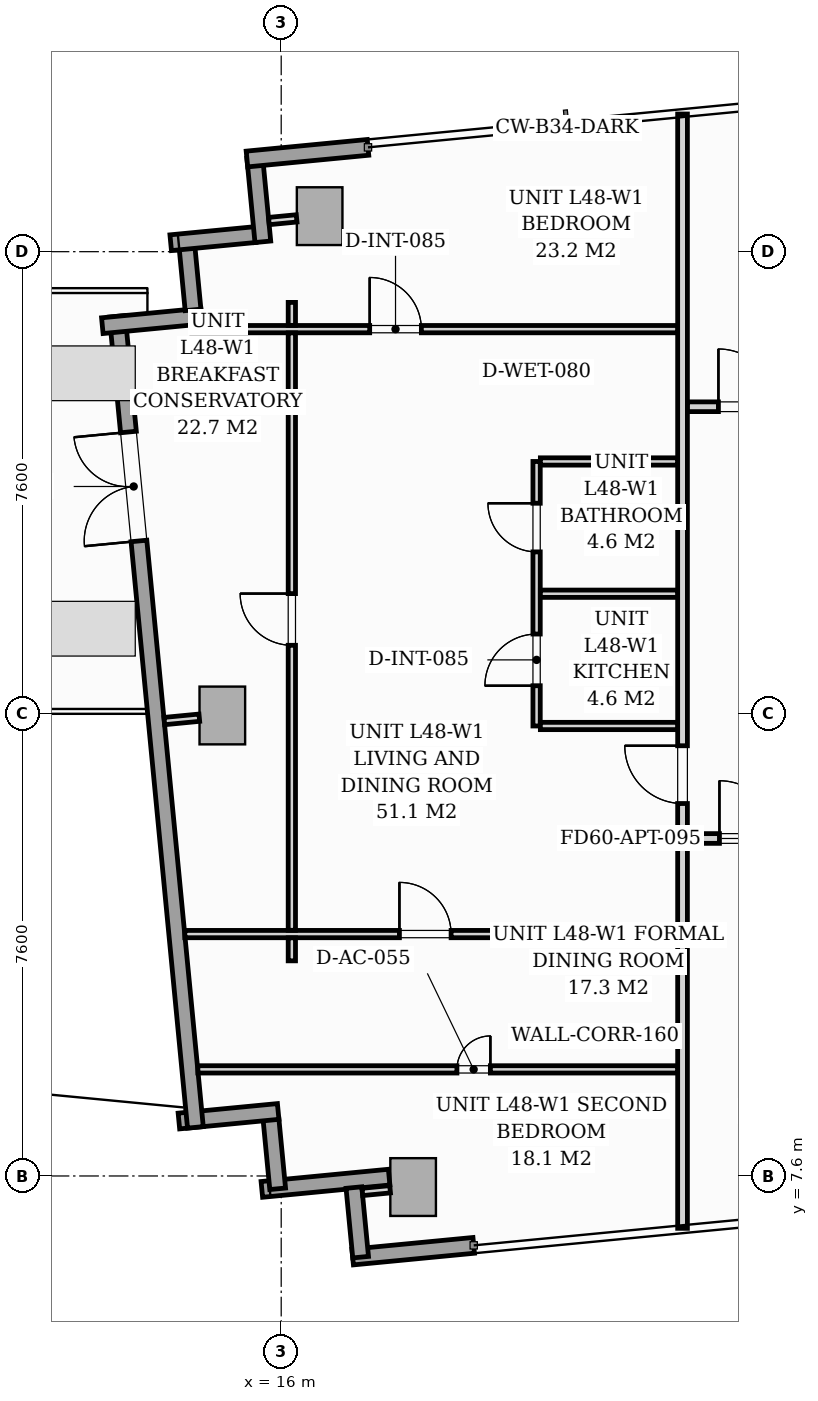
"""IFC4 building model, lengths in metres.
Left out: names, types, materials, properties, quantities, classifications, styles, units other than length and angle.
Written with IfcOpenShell. Run it as: python <this file> out.ifc"""

import sys

from ifc_helpers import new_model, si_unit, direction, frame, frame_2d, origin, origin_2d, place, context, subcontext, project, spatial, rectangle, extrude, source, transform, mapped, element, fill, save


model = new_model("IFC4")
c1 = context("Model", 3, precision=1e-05, world=origin(), true_north=direction((0.0, 1.0)))
c2 = subcontext(c1, "Body", "Model", "MODEL_VIEW")
j1 = project(units=[si_unit("LENGTHUNIT", "METRE"), si_unit("PLANEANGLEUNIT", "RADIAN")], contexts=[c1])
p1 = place(None, origin())
s1 = spatial("IfcSite", under=j1, at=p1, CompositionType="ELEMENT")
p2 = place(p1, origin())
s2 = spatial("IfcBuilding", under=s1, at=p2, CompositionType="ELEMENT")
p3 = place(p2, frame((0.0, 0.0, 167.8)))
s3 = spatial("IfcBuildingStorey", under=s2, at=p3, CompositionType="ELEMENT", Elevation=167.8)
m1 = source(origin(), c2, "Body", "SweptSolid", [
    extrude(rectangle(XDim=0.75, YDim=0.95, at=origin_2d()), origin(), (0.0, 0.0, 1.0), 5.194),
])
for number, where, z_axis, x_axis in (
    (1, (18.169, 7.418, 0.004), (0.0, 0.0, 1.0), (0.995, 0.096, 0.0)),
    (2, (16.632, 23.384, 0.004), (0.0, 0.0, 1.0), (0.995, 0.096, 0.0)),
    (3, (15.032, 15.173, 0.004), (0.0, 0.0, 1.0), (0.995, 0.096, 0.0)),
):
    element("IfcColumn", number, at=place(p3, frame(where, z_axis=z_axis, x_axis=x_axis)), inside=s3, PredefinedType="COLUMN", context=c2, shape_type="MappedRepresentation", body=[
        mapped(m1, transform((0.0, 0.0, 0.0), scale=1.0)),
    ])
p4 = place(p3, frame((17.775, 7.581, 0.0), z_axis=(0.0, 0.0, 1.0), x_axis=(-0.995392638166, -0.095882719431, 0.0)))
e4 = element("IfcWall", 4, at=p4, inside=s3, PredefinedType="STANDARD", context=c2, shape_type="SweptSolid", body=[
    extrude(rectangle(XDim=2.103, YDim=0.26, at=frame_2d((1.052, 0.0))), origin(), (0.0, 0.0, 1.0), 4.94),
])
p5 = place(p3, frame((15.942, 7.389, 0.0), z_axis=(0.0, 0.0, 1.0), x_axis=(-0.09576095695, 0.995404359607, 0.0)))
e5 = element("IfcWall", 5, at=p5, inside=s3, PredefinedType="STANDARD", context=c2, shape_type="SweptSolid", body=[
    extrude(rectangle(XDim=1.15, YDim=0.26, at=frame_2d((0.575, 0.0))), origin(), (0.0, 0.0, 1.0), 4.94),
])
p6 = place(p3, frame((15.95, 8.661, 0.0), z_axis=(0.0, 0.0, 1.0), x_axis=(-0.995394563142, -0.095862733462, 0.0)))
e6 = element("IfcWall", 6, at=p6, inside=s3, PredefinedType="STANDARD", context=c2, shape_type="SweptSolid", body=[
    extrude(rectangle(XDim=1.64, YDim=0.26, at=frame_2d((0.82, 0.0))), origin(), (0.0, 0.0, 1.0), 4.94),
])
p7 = place(p3, frame((14.589, 8.399, 0.0), z_axis=(0.0, 0.0, 1.0), x_axis=(-0.095853703289, 0.995395432763, 0.0)))
e7 = element("IfcWall", 7, at=p7, inside=s3, PredefinedType="STANDARD", context=c2, shape_type="SweptSolid", body=[
    extrude(rectangle(XDim=13.4, YDim=0.26, at=frame_2d((6.7, 0.0))), origin(), (0.0, 0.0, 1.0), 4.94),
])
p8 = place(p7, frame((9.688, 0.0, 0.0)))
e8 = element("IfcOpeningElement", 8, at=p8, cuts=e7, PredefinedType="OPENING", context=c2, shape_type="SweptSolid", body=[
    extrude(rectangle(XDim=1.8, YDim=2.1, at=frame_2d((0.9, 1.05))), frame((0.0, 0.14, 0.0), z_axis=(0.0, -1.0, 0.0), x_axis=(1.0, 0.0, 0.0)), (0.0, 0.0, 1.0), 0.28),
])
p9 = place(p3, frame((13.058, 21.583, 0.0), z_axis=(0.0, 0.0, 1.0), x_axis=(0.995394563142, 0.095862733462, 0.0)))
e9 = element("IfcWall", 9, at=p9, inside=s3, PredefinedType="STANDARD", context=c2, shape_type="SweptSolid", body=[
    extrude(rectangle(XDim=1.64, YDim=0.26, at=frame_2d((0.82, 0.0))), origin(), (0.0, 0.0, 1.0), 4.94),
])
p10 = place(p3, frame((14.55, 21.843, 0.0), z_axis=(0.0, 0.0, 1.0), x_axis=(-0.09576095695, 0.995404359607, 0.0)))
e10 = element("IfcWall", 10, at=p10, inside=s3, PredefinedType="STANDARD", context=c2, shape_type="SweptSolid", body=[
    extrude(rectangle(XDim=1.15, YDim=0.26, at=frame_2d((0.575, 0.0))), origin(), (0.0, 0.0, 1.0), 4.94),
])
p11 = place(p3, frame((14.183, 22.947, 0.0), z_axis=(0.0, 0.0, 1.0), x_axis=(0.99540614245, 0.095742423056, 0.0)))
e11 = element("IfcWall", 11, at=p11, inside=s3, PredefinedType="STANDARD", context=c2, shape_type="SweptSolid", body=[
    extrude(rectangle(XDim=1.395, YDim=0.26, at=frame_2d((0.697, 0.0))), origin(), (0.0, 0.0, 1.0), 4.94),
])
p12 = place(p3, frame((15.698, 22.963, 0.0), z_axis=(0.0, 0.0, 1.0), x_axis=(-0.09589913835, 0.995391056452, 0.0)))
e12 = element("IfcWall", 12, at=p12, inside=s3, PredefinedType="STANDARD", context=c2, shape_type="SweptSolid", body=[
    extrude(rectangle(XDim=1.395, YDim=0.26, at=frame_2d((0.698, 0.0))), origin(), (0.0, 0.0, 1.0), 4.94),
])
p13 = place(p3, frame((15.437, 24.324, 0.0), z_axis=(0.0, 0.0, 1.0), x_axis=(0.995398960025, 0.095817067274, 0.0)))
e13 = element("IfcWall", 13, at=p13, inside=s3, PredefinedType="STANDARD", context=c2, shape_type="SweptSolid", body=[
    extrude(rectangle(XDim=2.0, YDim=0.26, at=frame_2d((1.0, 0.0))), origin(), (0.0, 0.0, 1.0), 4.94),
])
p14 = place(p3, frame((19.166, 6.459, 0.0), z_axis=(0.0, 0.0, 1.0), x_axis=(-0.995397839199, -0.095828710298, 0.0)))
e14 = element("IfcWall", 14, at=p14, inside=s3, PredefinedType="STANDARD", context=c2, shape_type="SweptSolid", body=[
    extrude(rectangle(XDim=2.0, YDim=0.26, at=frame_2d((1.0, 0.0))), origin(), (0.0, 0.0, 1.0), 4.94),
])
p15 = place(p3, frame((17.306, 6.265, 0.0), z_axis=(0.0, 0.0, 1.0), x_axis=(-0.095971333708, 0.995384098279, 0.0)))
e15 = element("IfcWall", 15, at=p15, inside=s3, PredefinedType="STANDARD", context=c2, shape_type="SweptSolid", body=[
    extrude(rectangle(XDim=1.15, YDim=0.26, at=frame_2d((0.575, 0.0))), origin(), (0.0, 0.0, 1.0), 4.94),
])
p16 = place(p3, frame((22.6, 13.15, 0.0), z_axis=(0.0, 0.0, 1.0), x_axis=(1.0, 0.0, 0.0)))
e16 = element("IfcWall", 16, at=p16, inside=s3, PredefinedType="PARTITIONING", context=c2, shape_type="SweptSolid", body=[
    extrude(rectangle(XDim=23.28, YDim=0.16, at=frame_2d((11.64, 0.0))), origin(), (0.0, 0.0, 1.0), 4.94),
])
p17 = place(p16, frame((0.607, 0.0, 0.0)))
e17 = element("IfcOpeningElement", 17, at=p17, cuts=e16, PredefinedType="OPENING", context=c2, shape_type="SweptSolid", body=[
    extrude(rectangle(XDim=0.95, YDim=2.06, at=frame_2d((0.475, 1.03))), frame((0.0, 0.09, 0.0), z_axis=(0.0, -1.0, 0.0), x_axis=(1.0, 0.0, 0.0)), (0.0, 0.0, 1.0), 0.18),
])
p18 = place(p16, frame((11.717, 0.0, 0.0)))
e18 = element("IfcOpeningElement", 18, at=p18, cuts=e16, PredefinedType="OPENING", context=c2, shape_type="SweptSolid", body=[
    extrude(rectangle(XDim=0.95, YDim=2.06, at=frame_2d((0.475, 1.03))), frame((0.0, 0.09, 0.0), z_axis=(0.0, -1.0, 0.0), x_axis=(1.0, 0.0, 0.0)), (0.0, 0.0, 1.0), 0.18),
])
p19 = place(p3, frame((22.6, 6.74, 0.0), z_axis=(0.0, 0.0, 1.0), x_axis=(0.0, 1.0, 0.0)))
e19 = element("IfcWall", 19, at=p19, inside=s3, PredefinedType="PARTITIONING", context=c2, shape_type="SweptSolid", body=[
    extrude(rectangle(XDim=6.329, YDim=0.16, at=frame_2d((3.164, 0.0))), origin(), (0.0, 0.0, 1.0), 4.94),
])
p20 = place(p3, frame((22.6, 13.232, 0.0), z_axis=(0.0, 0.0, 1.0), x_axis=(0.0, 1.0, 0.0)))
e20 = element("IfcWall", 20, at=p20, inside=s3, PredefinedType="PARTITIONING", context=c2, shape_type="SweptSolid", body=[
    extrude(rectangle(XDim=11.832, YDim=0.16, at=frame_2d((5.916, 0.0))), origin(), (0.0, 0.0, 1.0), 4.94),
])
p21 = place(p20, frame((0.493, 0.0, 0.0)))
e21 = element("IfcOpeningElement", 21, at=p21, cuts=e20, PredefinedType="OPENING", context=c2, shape_type="SweptSolid", body=[
    extrude(rectangle(XDim=0.95, YDim=2.06, at=frame_2d((0.475, 1.03))), frame((0.0, 0.09, 0.0), z_axis=(0.0, -1.0, 0.0), x_axis=(1.0, 0.0, 0.0)), (0.0, 0.0, 1.0), 0.18),
])
p22 = place(p3, frame((20.2, 15.0, 0.0), z_axis=(0.0, 0.0, 1.0), x_axis=(0.0, 1.0, 0.0)))
e22 = element("IfcWall", 22, at=p22, inside=s3, PredefinedType="PARTITIONING", context=c2, shape_type="SweptSolid", body=[
    extrude(rectangle(XDim=4.35, YDim=0.12, at=frame_2d((2.175, 0.0))), origin(), (0.0, 0.0, 1.0), 4.94),
])
p23 = place(p22, frame((0.662, 0.0, 0.0)))
e23 = element("IfcOpeningElement", 23, at=p23, cuts=e22, PredefinedType="OPENING", context=c2, shape_type="SweptSolid", body=[
    extrude(rectangle(XDim=0.85, YDim=2.05, at=frame_2d((0.425, 1.025))), frame((0.0, 0.07, 0.0), z_axis=(0.0, -1.0, 0.0), x_axis=(1.0, 0.0, 0.0)), (0.0, 0.0, 1.0), 0.14),
])
p24 = place(p22, frame((2.863, 0.0, 0.0)))
e24 = element("IfcOpeningElement", 24, at=p24, cuts=e22, PredefinedType="OPENING", context=c2, shape_type="SweptSolid", body=[
    extrude(rectangle(XDim=0.8, YDim=2.02, at=frame_2d((0.4, 1.01))), frame((0.0, 0.07, 0.0), z_axis=(0.0, -1.0, 0.0), x_axis=(1.0, 0.0, 0.0)), (0.0, 0.0, 1.0), 0.14),
])
for number, where, z_axis, x_axis in (
    (25, (20.262, 17.175, 0.0), (0.0, 0.0, 1.0), (1.0, 0.0, 0.0)),
    (26, (20.262, 15.0, 0.0), (0.0, 0.0, 1.0), (1.0, 0.0, 0.0)),
    (27, (20.262, 19.35, 0.0), (0.0, 0.0, 1.0), (1.0, 0.0, 0.0)),
):
    element("IfcWall", number, at=place(p3, frame(where, z_axis=z_axis, x_axis=x_axis)), inside=s3, PredefinedType="PARTITIONING", context=c2, shape_type="SweptSolid", body=[
        extrude(rectangle(XDim=2.256, YDim=0.12, at=frame_2d((1.128, 0.0))), origin(), (0.0, 0.0, 1.0), 4.94),
    ])
p25 = place(p3, frame((14.53, 21.526, 0.0), z_axis=(0.0, 0.0, 1.0), x_axis=(1.0, 0.0, 0.0)))
e28 = element("IfcWall", 28, at=p25, inside=s3, PredefinedType="PARTITIONING", context=c2, shape_type="SweptSolid", body=[
    extrude(rectangle(XDim=7.988, YDim=0.12, at=frame_2d((3.994, 0.0))), origin(), (0.0, 0.0, 1.0), 4.94),
])
p26 = place(p25, frame((2.925, 0.0, 0.0)))
e29 = element("IfcOpeningElement", 29, at=p26, cuts=e28, PredefinedType="OPENING", context=c2, shape_type="SweptSolid", body=[
    extrude(rectangle(XDim=0.85, YDim=2.05, at=frame_2d((0.425, 1.025))), frame((0.0, 0.07, 0.0), z_axis=(0.0, -1.0, 0.0), x_axis=(1.0, 0.0, 0.0)), (0.0, 0.0, 1.0), 0.14),
])
p27 = place(p3, frame((14.63, 9.353, 0.0), z_axis=(0.0, 0.0, 1.0), x_axis=(1.0, 0.0, 0.0)))
e30 = element("IfcWall", 30, at=p27, inside=s3, PredefinedType="PARTITIONING", context=c2, shape_type="SweptSolid", body=[
    extrude(rectangle(XDim=7.888, YDim=0.12, at=frame_2d((3.944, 0.0))), origin(), (0.0, 0.0, 1.0), 4.94),
])
p28 = place(p27, frame((4.26, 0.0, 0.0)))
e31 = element("IfcOpeningElement", 31, at=p28, cuts=e30, PredefinedType="OPENING", context=c2, shape_type="SweptSolid", body=[
    extrude(rectangle(XDim=0.55, YDim=2.0, at=frame_2d((0.275, 1.0))), frame((0.0, 0.07, 0.0), z_axis=(0.0, -1.0, 0.0), x_axis=(1.0, 0.0, 0.0)), (0.0, 0.0, 1.0), 0.14),
])
p29 = place(p3, frame((14.416, 11.578, 0.0), z_axis=(0.0, 0.0, 1.0), x_axis=(1.0, 0.0, 0.0)))
e32 = element("IfcWall", 32, at=p29, inside=s3, PredefinedType="PARTITIONING", context=c2, shape_type="SweptSolid", body=[
    extrude(rectangle(XDim=8.103, YDim=0.12, at=frame_2d((4.051, 0.0))), origin(), (0.0, 0.0, 1.0), 4.94),
])
p30 = place(p29, frame((3.529, 0.0, 0.0)))
e33 = element("IfcOpeningElement", 33, at=p30, cuts=e32, PredefinedType="OPENING", context=c2, shape_type="SweptSolid", body=[
    extrude(rectangle(XDim=0.85, YDim=2.05, at=frame_2d((0.425, 1.025))), frame((0.0, 0.07, 0.0), z_axis=(0.0, -1.0, 0.0), x_axis=(1.0, 0.0, 0.0)), (0.0, 0.0, 1.0), 0.14),
])
p31 = place(p3, frame((16.175, 11.138, 0.0), z_axis=(0.0, 0.0, 1.0), x_axis=(0.0, 1.0, 0.0)))
e34 = element("IfcWall", 34, at=p31, inside=s3, PredefinedType="PARTITIONING", context=c2, shape_type="SweptSolid", body=[
    extrude(rectangle(XDim=0.378, YDim=0.12, at=frame_2d((0.189, 0.0))), origin(), (0.0, 0.0, 1.0), 4.94),
])
p32 = place(p3, frame((16.175, 11.64, 0.0), z_axis=(0.0, 0.0, 1.0), x_axis=(0.0, 1.0, 0.0)))
e35 = element("IfcWall", 35, at=p32, inside=s3, PredefinedType="PARTITIONING", context=c2, shape_type="SweptSolid", body=[
    extrude(rectangle(XDim=9.824, YDim=0.12, at=frame_2d((4.912, 0.0))), origin(), (0.0, 0.0, 1.0), 4.383),
])
p33 = place(p32, frame((4.687, 0.0, 0.0)))
e36 = element("IfcOpeningElement", 36, at=p33, cuts=e35, PredefinedType="OPENING", context=c2, shape_type="SweptSolid", body=[
    extrude(rectangle(XDim=0.85, YDim=2.05, at=frame_2d((0.425, 1.025))), frame((0.0, 0.07, 0.0), z_axis=(0.0, -1.0, 0.0), x_axis=(1.0, 0.0, 0.0)), (0.0, 0.0, 1.0), 0.14),
])
p34 = place(p3, frame((16.175, 21.588, 0.0), z_axis=(0.0, 0.0, 1.0), x_axis=(0.0, 1.0, 0.0)))
e37 = element("IfcWall", 37, at=p34, inside=s3, PredefinedType="PARTITIONING", context=c2, shape_type="SweptSolid", body=[
    extrude(rectangle(XDim=0.378, YDim=0.12, at=frame_2d((0.189, 0.0))), origin(), (0.0, 0.0, 1.0), 4.94),
])
p35 = place(p3, frame((22.682, 20.25, 0.0), z_axis=(0.0, 0.0, 1.0), x_axis=(1.0, 0.0, 0.0)))
e38 = element("IfcWall", 38, at=p35, inside=s3, PredefinedType="PARTITIONING", context=c2, shape_type="SweptSolid", body=[
    extrude(rectangle(XDim=1.886, YDim=0.16, at=frame_2d((0.943, 0.0))), origin(), (0.0, 0.0, 1.0), 4.94),
])
p36 = place(p35, frame((0.508, 0.0, 0.0)))
e39 = element("IfcOpeningElement", 39, at=p36, cuts=e38, PredefinedType="OPENING", context=c2, shape_type="SweptSolid", body=[
    extrude(rectangle(XDim=0.95, YDim=2.06, at=frame_2d((0.475, 1.03))), frame((0.0, 0.09, 0.0), z_axis=(0.0, -1.0, 0.0), x_axis=(1.0, 0.0, 0.0)), (0.0, 0.0, 1.0), 0.18),
])
for number, where, z_axis, x_axis in (
    (40, (17.791, 7.382, 0.0), (0.0, 0.0, 1.0), (-0.995, -0.096, 0.0)),
    (41, (16.254, 23.348, 0.0), (0.0, 0.0, 1.0), (-0.995, -0.096, 0.0)),
):
    element("IfcWall", number, at=place(p3, frame(where, z_axis=z_axis, x_axis=x_axis)), inside=s3, PredefinedType="PARTITIONING", context=c2, shape_type="SweptSolid", body=[
        extrude(rectangle(XDim=0.458, YDim=0.12, at=frame_2d((0.229, 0.0))), origin(), (0.0, 0.0, 1.0), 4.94),
    ])
p37 = place(p3, frame((14.654, 15.136, 0.0), z_axis=(0.0, 0.0, 1.0), x_axis=(-0.995394316061, -0.095865299001, 0.0)))
e42 = element("IfcWall", 42, at=p37, inside=s3, PredefinedType="PARTITIONING", context=c2, shape_type="SweptSolid", body=[
    extrude(rectangle(XDim=0.578, YDim=0.12, at=frame_2d((0.289, 0.0))), origin(), (0.0, 0.0, 1.0), 4.94),
])
m2 = source(origin(), c2, "Body", "SweptSolid", [
    extrude(rectangle(XDim=1.8, YDim=2.1, at=frame_2d((0.9, 1.05))), frame((0.0, 0.025, 0.0), z_axis=(0.0, -1.0, 0.0), x_axis=(1.0, 0.0, 0.0)), (0.0, 0.0, 1.0), 0.05),
])
p38 = place(p8, origin())
e43 = element("IfcDoor", 43, at=p38, inside=s3, OperationType="DOUBLE_DOOR_SINGLE_SWING", PredefinedType="DOOR", context=c2, shape_type="MappedRepresentation", body=[
    mapped(m2, transform((0.0, 0.0, 0.0), scale=1.0)),
])
fill(e8, e43)
m3 = source(origin(), c2, "Body", "SweptSolid", [
    extrude(rectangle(XDim=0.95, YDim=2.06, at=frame_2d((0.475, 1.03))), frame((0.0, 0.025, 0.0), z_axis=(0.0, -1.0, 0.0), x_axis=(1.0, 0.0, 0.0)), (0.0, 0.0, 1.0), 0.05),
])
p39 = place(p17, origin())
e44 = element("IfcDoor", 44, at=p39, inside=s3, OperationType="SINGLE_SWING_LEFT", PredefinedType="DOOR", context=c2, shape_type="MappedRepresentation", body=[
    mapped(m3, transform((0.0, 0.0, 0.0), scale=1.0)),
])
fill(e17, e44)
p40 = place(p21, origin())
e45 = element("IfcDoor", 45, at=p40, inside=s3, OperationType="SINGLE_SWING_RIGHT", PredefinedType="DOOR", context=c2, shape_type="MappedRepresentation", body=[
    mapped(m3, transform((0.0, 0.0, 0.0), scale=1.0)),
])
fill(e21, e45)
m4 = source(origin(), c2, "Body", "SweptSolid", [
    extrude(rectangle(XDim=0.85, YDim=2.05, at=frame_2d((0.425, 1.025))), frame((0.0, 0.025, 0.0), z_axis=(0.0, -1.0, 0.0), x_axis=(1.0, 0.0, 0.0)), (0.0, 0.0, 1.0), 0.05),
])
p41 = place(p23, origin())
e46 = element("IfcDoor", 46, at=p41, inside=s3, OperationType="SINGLE_SWING_LEFT", PredefinedType="DOOR", context=c2, shape_type="MappedRepresentation", body=[
    mapped(m4, transform((0.0, 0.0, 0.0), scale=1.0)),
])
fill(e23, e46)
m5 = source(origin(), c2, "Body", "SweptSolid", [
    extrude(rectangle(XDim=0.8, YDim=2.02, at=frame_2d((0.4, 1.01))), frame((0.0, 0.025, 0.0), z_axis=(0.0, -1.0, 0.0), x_axis=(1.0, 0.0, 0.0)), (0.0, 0.0, 1.0), 0.05),
])
p42 = place(p24, origin())
e47 = element("IfcDoor", 47, at=p42, inside=s3, OperationType="SINGLE_SWING_RIGHT", PredefinedType="DOOR", context=c2, shape_type="MappedRepresentation", body=[
    mapped(m5, transform((0.0, 0.0, 0.0), scale=1.0)),
])
fill(e24, e47)
p43 = place(p26, origin())
e48 = element("IfcDoor", 48, at=p43, inside=s3, OperationType="SINGLE_SWING_LEFT", PredefinedType="DOOR", context=c2, shape_type="MappedRepresentation", body=[
    mapped(m4, transform((0.0, 0.0, 0.0), scale=1.0)),
])
fill(e29, e48)
m6 = source(origin(), c2, "Body", "SweptSolid", [
    extrude(rectangle(XDim=0.55, YDim=2.0, at=frame_2d((0.275, 1.0))), frame((0.0, 0.025, 0.0), z_axis=(0.0, -1.0, 0.0), x_axis=(1.0, 0.0, 0.0)), (0.0, 0.0, 1.0), 0.05),
])
p44 = place(p28, origin())
e49 = element("IfcDoor", 49, at=p44, inside=s3, OperationType="SINGLE_SWING_RIGHT", PredefinedType="DOOR", context=c2, shape_type="MappedRepresentation", body=[
    mapped(m6, transform((0.0, 0.0, 0.0), scale=1.0)),
])
fill(e31, e49)
p45 = place(p30, origin())
e50 = element("IfcDoor", 50, at=p45, inside=s3, OperationType="SINGLE_SWING_LEFT", PredefinedType="DOOR", context=c2, shape_type="MappedRepresentation", body=[
    mapped(m4, transform((0.0, 0.0, 0.0), scale=1.0)),
])
fill(e33, e50)
p46 = place(p33, origin())
e51 = element("IfcDoor", 51, at=p46, inside=s3, OperationType="SINGLE_SWING_RIGHT", PredefinedType="DOOR", context=c2, shape_type="MappedRepresentation", body=[
    mapped(m4, transform((0.0, 0.0, 0.0), scale=1.0)),
])
fill(e36, e51)
p47 = place(p36, origin())
e52 = element("IfcDoor", 52, at=p47, inside=s3, OperationType="SINGLE_SWING_LEFT", PredefinedType="DOOR", context=c2, shape_type="MappedRepresentation", body=[
    mapped(m3, transform((0.0, 0.0, 0.0), scale=1.0)),
])
fill(e39, e52)
save(model, sys.argv[1])
